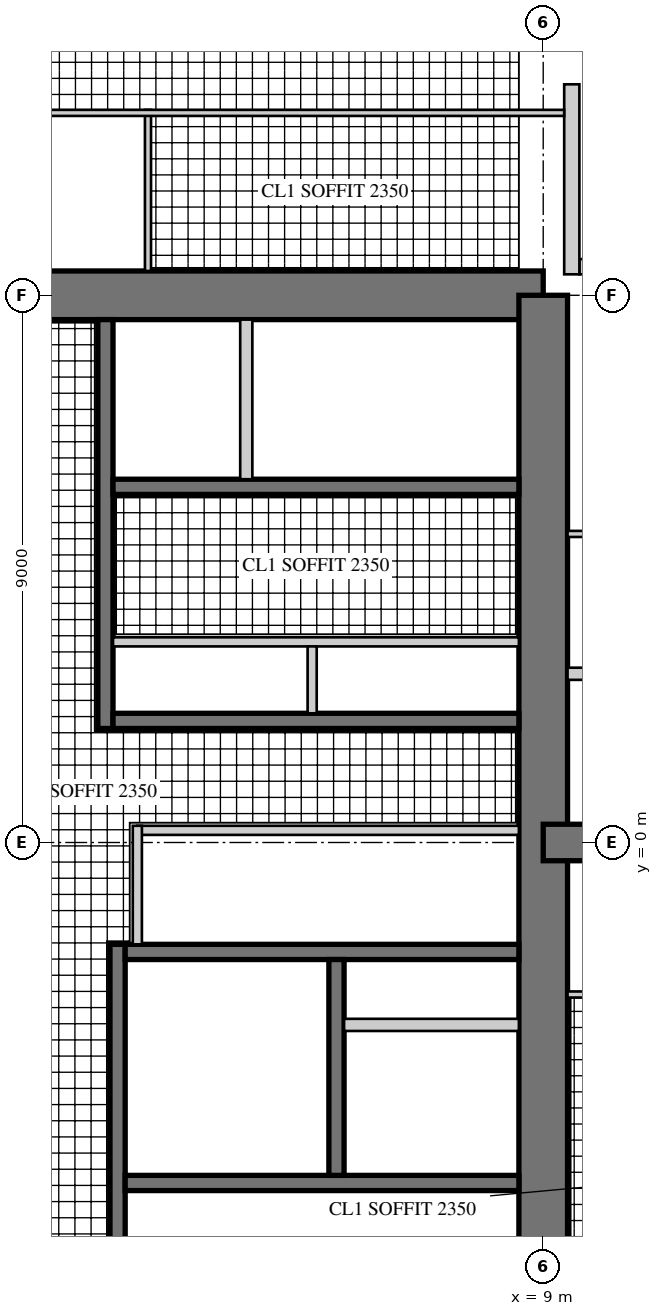
"""IFC4 building model, lengths in metres.
Left out: names, types, materials, properties, quantities, classifications, styles, units other than length and angle.
Written with IfcOpenShell. Run it as: python <this file> out.ifc"""

import sys

from ifc_helpers import new_model, si_unit, direction, frame, frame_2d, origin, place, context, subcontext, project, spatial, rectangle, hollow_rectangle, extrude, element, fill, save


model = new_model("IFC4")
c1 = context("Model", 3, precision=1e-05, world=origin(), true_north=direction((0.0, 1.0)))
c2 = subcontext(c1, "Body", "Model", "MODEL_VIEW")
j1 = project(units=[si_unit("LENGTHUNIT", "METRE"), si_unit("PLANEANGLEUNIT", "RADIAN")], contexts=[c1])
p1 = place(None, origin())
s1 = spatial("IfcSite", under=j1, at=p1, CompositionType="ELEMENT")
p2 = place(p1, origin())
s2 = spatial("IfcBuilding", under=s1, at=p2, CompositionType="ELEMENT")
p3 = place(p2, frame((0.0, 0.0, 261.1)))
s3 = spatial("IfcBuildingStorey", under=s2, at=p3, CompositionType="ELEMENT", Elevation=261.1)
p4 = place(p3, frame((9.0, 9.0, 0.0), z_axis=(0.0, 0.0, 1.0), x_axis=(-1.0, 0.0, 0.0)))
e1 = element("IfcWall", 1, at=p4, inside=s3, PredefinedType="SHEAR", context=c2, shape_type="SweptSolid", body=[
    extrude(rectangle(XDim=18.0, YDim=0.8, at=frame_2d((9.0, 0.0))), origin(), (0.0, 0.0, 1.0), 3.4),
])
p5 = place(p4, frame((9.8, 0.0, 0.0)))
e2 = element("IfcOpeningElement", 2, at=p5, cuts=e1, PredefinedType="OPENING", context=c2, shape_type="SweptSolid", body=[
    extrude(rectangle(XDim=1.0, YDim=2.4, at=frame_2d((0.5, 1.2))), frame((0.0, 0.41, 0.0), z_axis=(0.0, -1.0, 0.0), x_axis=(1.0, 0.0, 0.0)), (0.0, 0.0, 1.0), 0.82),
])
p6 = place(p3, frame((9.0, -9.0, 0.0), z_axis=(0.0, 0.0, 1.0), x_axis=(0.0, 1.0, 0.0)))
e3 = element("IfcWall", 3, at=p6, inside=s3, PredefinedType="SHEAR", context=c2, shape_type="SweptSolid", body=[
    extrude(rectangle(XDim=18.0, YDim=0.8, at=frame_2d((9.0, 0.0))), origin(), (0.0, 0.0, 1.0), 3.4),
])
p7 = place(p6, frame((9.8, 0.0, 0.0)))
e4 = element("IfcOpeningElement", 4, at=p7, cuts=e3, PredefinedType="OPENING", context=c2, shape_type="SweptSolid", body=[
    extrude(rectangle(XDim=1.0, YDim=2.4, at=frame_2d((0.5, 1.2))), frame((0.0, 0.41, 0.0), z_axis=(0.0, -1.0, 0.0), x_axis=(1.0, 0.0, 0.0)), (0.0, 0.0, 1.0), 0.82),
])
p8 = place(p3, frame((1.8, 1.875, 0.0), z_axis=(0.0, 0.0, 1.0), x_axis=(0.0, 1.0, 0.0)))
e5 = element("IfcWall", 5, at=p8, inside=s3, PredefinedType="SHEAR", context=c2, shape_type="SweptSolid", body=[
    extrude(rectangle(XDim=6.725, YDim=0.25, at=frame_2d((3.363, 0.0))), origin(), (0.0, 0.0, 1.0), 3.4),
])
p9 = place(p8, frame((1.875, 0.0, 0.0)))
e6 = element("IfcOpeningElement", 6, at=p9, cuts=e5, PredefinedType="OPENING", context=c2, shape_type="SweptSolid", body=[
    extrude(rectangle(XDim=1.6, YDim=2.4, at=frame_2d((0.8, 1.2))), frame((0.0, 0.135, 0.0), z_axis=(0.0, -1.0, 0.0), x_axis=(1.0, 0.0, 0.0)), (0.0, 0.0, 1.0), 0.27),
])
p10 = place(p3, frame((1.925, 2.0, 0.0), z_axis=(0.0, 0.0, 1.0), x_axis=(1.0, 0.0, 0.0)))
e7 = element("IfcWall", 7, at=p10, inside=s3, PredefinedType="SHEAR", context=c2, shape_type="SweptSolid", body=[
    extrude(rectangle(XDim=6.675, YDim=0.25, at=frame_2d((3.337, 0.0))), origin(), (0.0, 0.0, 1.0), 3.4),
])
p11 = place(p3, frame((1.925, 5.85, 0.0), z_axis=(0.0, 0.0, 1.0), x_axis=(1.0, 0.0, 0.0)))
e8 = element("IfcWall", 8, at=p11, inside=s3, PredefinedType="SHEAR", context=c2, shape_type="SweptSolid", body=[
    extrude(rectangle(XDim=6.675, YDim=0.25, at=frame_2d((3.337, 0.0))), origin(), (0.0, 0.0, 1.0), 3.4),
])
p12 = place(p11, frame((0.546, 0.0, 0.0)))
e9 = element("IfcOpeningElement", 9, at=p12, cuts=e8, PredefinedType="OPENING", context=c2, shape_type="SweptSolid", body=[
    extrude(rectangle(XDim=1.0, YDim=2.1, at=frame_2d((0.5, 1.05))), frame((0.0, 0.135, 0.0), z_axis=(0.0, -1.0, 0.0), x_axis=(1.0, 0.0, 0.0)), (0.0, 0.0, 1.0), 0.27),
])
p13 = place(p11, frame((2.837, 0.0, 0.0)))
e10 = element("IfcOpeningElement", 10, at=p13, cuts=e8, PredefinedType="OPENING", context=c2, shape_type="SweptSolid", body=[
    extrude(rectangle(XDim=1.0, YDim=2.1, at=frame_2d((0.5, 1.05))), frame((0.0, 0.135, 0.0), z_axis=(0.0, -1.0, 0.0), x_axis=(1.0, 0.0, 0.0)), (0.0, 0.0, 1.0), 0.27),
])
p14 = place(p3, frame((1.925, 3.3, 0.0), z_axis=(0.0, 0.0, 1.0), x_axis=(1.0, 0.0, 0.0)))
e11 = element("IfcWall", 11, at=p14, inside=s3, PredefinedType="PARTITIONING", context=c2, shape_type="SweptSolid", body=[
    extrude(rectangle(XDim=6.675, YDim=0.15, at=frame_2d((3.337, 0.0))), origin(), (0.0, 0.0, 1.0), 3.4),
])
p15 = place(p14, frame((0.075, 0.0, 0.0)))
e12 = element("IfcOpeningElement", 12, at=p15, cuts=e11, PredefinedType="OPENING", context=c2, shape_type="SweptSolid", body=[
    extrude(rectangle(XDim=0.8, YDim=2.1, at=frame_2d((0.4, 1.05))), frame((0.0, 0.085, 0.0), z_axis=(0.0, -1.0, 0.0), x_axis=(1.0, 0.0, 0.0)), (0.0, 0.0, 1.0), 0.17),
])
p16 = place(p14, frame((3.675, 0.0, 0.0)))
e13 = element("IfcOpeningElement", 13, at=p16, cuts=e11, PredefinedType="OPENING", context=c2, shape_type="SweptSolid", body=[
    extrude(rectangle(XDim=0.8, YDim=2.1, at=frame_2d((0.4, 1.05))), frame((0.0, 0.085, 0.0), z_axis=(0.0, -1.0, 0.0), x_axis=(1.0, 0.0, 0.0)), (0.0, 0.0, 1.0), 0.17),
])
p17 = place(p3, frame((5.2, 2.125, 0.0), z_axis=(0.0, 0.0, 1.0), x_axis=(0.0, 1.0, 0.0)))
e14 = element("IfcWall", 14, at=p17, inside=s3, PredefinedType="PARTITIONING", context=c2, shape_type="SweptSolid", body=[
    extrude(rectangle(XDim=1.1, YDim=0.15, at=frame_2d((0.55, 0.0))), origin(), (0.0, 0.0, 1.0), 3.4),
])
p18 = place(p3, frame((4.117, 5.975, 0.0), z_axis=(0.0, 0.0, 1.0), x_axis=(0.0, 1.0, 0.0)))
e15 = element("IfcWall", 15, at=p18, inside=s3, PredefinedType="PARTITIONING", context=c2, shape_type="SweptSolid", body=[
    extrude(rectangle(XDim=2.625, YDim=0.2, at=frame_2d((1.312, 0.0))), origin(), (0.0, 0.0, 1.0), 3.4),
])
p19 = place(p3, frame((2.0, -1.675, 0.0), z_axis=(0.0, 0.0, 1.0), x_axis=(0.0, -1.0, 0.0)))
e16 = element("IfcWall", 16, at=p19, inside=s3, PredefinedType="SHEAR", context=c2, shape_type="SweptSolid", body=[
    extrude(rectangle(XDim=6.925, YDim=0.25, at=frame_2d((3.462, 0.0))), origin(), (0.0, 0.0, 1.0), 3.4),
])
p20 = place(p19, frame((0.725, 0.0, 0.0)))
e17 = element("IfcOpeningElement", 17, at=p20, cuts=e16, PredefinedType="OPENING", context=c2, shape_type="SweptSolid", body=[
    extrude(rectangle(XDim=1.0, YDim=2.1, at=frame_2d((0.5, 1.05))), frame((0.0, 0.135, 0.0), z_axis=(0.0, -1.0, 0.0), x_axis=(1.0, 0.0, 0.0)), (0.0, 0.0, 1.0), 0.27),
])
p21 = place(p3, frame((2.125, -1.8, 0.0), z_axis=(0.0, 0.0, 1.0), x_axis=(1.0, 0.0, 0.0)))
e18 = element("IfcWall", 18, at=p21, inside=s3, PredefinedType="SHEAR", context=c2, shape_type="SweptSolid", body=[
    extrude(rectangle(XDim=6.475, YDim=0.25, at=frame_2d((3.238, 0.0))), origin(), (0.0, 0.0, 1.0), 3.4),
])
p22 = place(p3, frame((2.125, -5.6, 0.0), z_axis=(0.0, 0.0, 1.0), x_axis=(1.0, 0.0, 0.0)))
e19 = element("IfcWall", 19, at=p22, inside=s3, PredefinedType="SHEAR", context=c2, shape_type="SweptSolid", body=[
    extrude(rectangle(XDim=6.475, YDim=0.25, at=frame_2d((3.238, 0.0))), origin(), (0.0, 0.0, 1.0), 3.4),
])
p23 = place(p22, frame((0.175, 0.0, 0.0)))
e20 = element("IfcOpeningElement", 20, at=p23, cuts=e19, PredefinedType="OPENING", context=c2, shape_type="SweptSolid", body=[
    extrude(rectangle(XDim=1.0, YDim=2.1, at=frame_2d((0.5, 1.05))), frame((0.0, 0.135, 0.0), z_axis=(0.0, -1.0, 0.0), x_axis=(1.0, 0.0, 0.0)), (0.0, 0.0, 1.0), 0.27),
])
p24 = place(p3, frame((5.6, -1.925, 0.0), z_axis=(0.0, 0.0, 1.0), x_axis=(0.0, -1.0, 0.0)))
e21 = element("IfcWall", 21, at=p24, inside=s3, PredefinedType="SHEAR", context=c2, shape_type="SweptSolid", body=[
    extrude(rectangle(XDim=3.55, YDim=0.25, at=frame_2d((1.775, 0.0))), origin(), (0.0, 0.0, 1.0), 3.4),
])
p25 = place(p24, frame((1.525, 0.0, 0.0)))
e22 = element("IfcOpeningElement", 22, at=p25, cuts=e21, PredefinedType="OPENING", context=c2, shape_type="SweptSolid", body=[
    extrude(rectangle(XDim=1.1, YDim=2.2, at=frame_2d((0.55, 1.1))), frame((0.0, 0.135, 0.0), z_axis=(0.0, -1.0, 0.0), x_axis=(1.0, 0.0, 0.0)), (0.0, 0.0, 1.0), 0.27),
])
p26 = place(p24, frame((0.075, 0.0, 0.0)))
e23 = element("IfcOpeningElement", 23, at=p26, cuts=e21, PredefinedType="OPENING", context=c2, shape_type="SweptSolid", body=[
    extrude(rectangle(XDim=0.8, YDim=2.1, at=frame_2d((0.4, 1.05))), frame((0.0, 0.135, 0.0), z_axis=(0.0, -1.0, 0.0), x_axis=(1.0, 0.0, 0.0)), (0.0, 0.0, 1.0), 0.27),
])
p27 = place(p3, frame((5.725, -3.0, 0.0), z_axis=(0.0, 0.0, 1.0), x_axis=(1.0, 0.0, 0.0)))
e24 = element("IfcWall", 24, at=p27, inside=s3, PredefinedType="PARTITIONING", context=c2, shape_type="SweptSolid", body=[
    extrude(rectangle(XDim=2.875, YDim=0.2, at=frame_2d((1.438, 0.0))), origin(), (0.0, 0.0, 1.0), 3.4),
])
p28 = place(p3, frame((9.0, 0.0, 0.0), z_axis=(0.0, 0.0, 1.0), x_axis=(1.0, 0.0, 0.0)))
e25 = element("IfcWall", 25, at=p28, inside=s3, PredefinedType="SHEAR", context=c2, shape_type="SweptSolid", body=[
    extrude(rectangle(XDim=9.0, YDim=0.6, at=frame_2d((4.5, 0.0))), origin(), (0.0, 0.0, 1.0), 3.4),
])
p29 = place(p28, frame((3.8, 0.0, 0.0)))
e26 = element("IfcOpeningElement", 26, at=p29, cuts=e25, PredefinedType="OPENING", context=c2, shape_type="SweptSolid", body=[
    extrude(rectangle(XDim=1.0, YDim=2.15, at=frame_2d((0.5, 1.075))), frame((0.0, 0.31, 0.0), z_axis=(0.0, -1.0, 0.0), x_axis=(1.0, 0.0, 0.0)), (0.0, 0.0, 1.0), 0.62),
])
p30 = place(p28, frame((7.0, 0.0, 0.0)))
e27 = element("IfcOpeningElement", 27, at=p30, cuts=e25, PredefinedType="OPENING", context=c2, shape_type="SweptSolid", body=[
    extrude(rectangle(XDim=1.0, YDim=2.2, at=frame_2d((0.5, 1.1))), frame((0.0, 0.31, 0.0), z_axis=(0.0, -1.0, 0.0), x_axis=(1.0, 0.0, 0.0)), (0.0, 0.0, 1.0), 0.62),
])
p31 = place(p3, frame((12.47, 9.47, 0.0), z_axis=(0.0, 0.0, 1.0), x_axis=(-1.0, 0.0, 0.0)))
e28 = element("IfcWall", 28, at=p31, inside=s3, PredefinedType="SOLIDWALL", context=c2, shape_type="SweptSolid", body=[
    extrude(rectangle(XDim=2.875, YDim=0.25, at=frame_2d((1.438, 0.0))), origin(), (0.0, 0.0, 1.0), 3.22),
])
p32 = place(p31, frame((0.6, 0.0, 0.0)))
e29 = element("IfcOpeningElement", 29, at=p32, cuts=e28, PredefinedType="OPENING", context=c2, shape_type="SweptSolid", body=[
    extrude(rectangle(XDim=1.0, YDim=2.2, at=frame_2d((0.5, 1.1))), frame((0.0, 0.135, 0.0), z_axis=(0.0, -1.0, 0.0), x_axis=(1.0, 0.0, 0.0)), (0.0, 0.0, 1.0), 0.27),
])
p33 = place(p3, frame((9.47, 9.345, 0.0), z_axis=(0.0, 0.0, 1.0), x_axis=(0.0, 1.0, 0.0)))
e30 = element("IfcWall", 30, at=p33, inside=s3, PredefinedType="SOLIDWALL", context=c2, shape_type="SweptSolid", body=[
    extrude(rectangle(XDim=3.125, YDim=0.25, at=frame_2d((1.562, 0.0))), origin(), (0.0, 0.0, 1.0), 3.22),
])
p34 = place(p33, frame((0.6, 0.0, 0.0)))
e31 = element("IfcOpeningElement", 31, at=p34, cuts=e30, PredefinedType="OPENING", context=c2, shape_type="SweptSolid", body=[
    extrude(rectangle(XDim=1.0, YDim=2.2, at=frame_2d((0.5, 1.1))), frame((0.0, 0.135, 0.0), z_axis=(0.0, -1.0, 0.0), x_axis=(1.0, 0.0, 0.0)), (0.0, 0.0, 1.0), 0.27),
])
p35 = place(p3, frame((2.325, 0.2, 0.0), z_axis=(0.0, 0.0, 1.0), x_axis=(1.0, 0.0, 0.0)))
e32 = element("IfcWall", 32, at=p35, inside=s3, PredefinedType="PARTITIONING", context=c2, shape_type="SweptSolid", body=[
    extrude(rectangle(XDim=6.275, YDim=0.15, at=frame_2d((3.138, 0.0))), origin(), (0.0, 0.0, 1.0), 3.22),
])
p36 = place(p35, frame((0.4, 0.0, 0.0)))
e33 = element("IfcOpeningElement", 33, at=p36, cuts=e32, PredefinedType="OPENING", context=c2, shape_type="SweptSolid", body=[
    extrude(rectangle(XDim=1.0, YDim=2.1, at=frame_2d((0.5, 1.05))), frame((0.0, 0.085, 0.0), z_axis=(0.0, -1.0, 0.0), x_axis=(1.0, 0.0, 0.0)), (0.0, 0.0, 1.0), 0.17),
])
p37 = place(p3, frame((2.325, -1.675, 0.0), z_axis=(0.0, 0.0, 1.0), x_axis=(0.0, 1.0, 0.0)))
e34 = element("IfcWall", 34, at=p37, inside=s3, PredefinedType="PARTITIONING", context=c2, shape_type="SweptSolid", body=[
    extrude(rectangle(XDim=1.95, YDim=0.15, at=frame_2d((0.975, 0.0))), origin(), (0.0, 0.0, 1.0), 3.22),
])
p38 = place(p3, frame((2.5, 9.4, 0.0), z_axis=(0.0, 0.0, 1.0), x_axis=(0.0, 1.0, 0.0)))
e35 = element("IfcWall", 35, at=p38, inside=s3, PredefinedType="PARTITIONING", context=c2, shape_type="SweptSolid", body=[
    extrude(rectangle(XDim=2.65, YDim=0.1, at=frame_2d((1.325, 0.0))), origin(), (0.0, 0.0, 1.0), 3.22),
])
p39 = place(p3, frame((9.345, 12.0, 0.0), z_axis=(0.0, 0.0, 1.0), x_axis=(-1.0, 0.0, 0.0)))
e36 = element("IfcWall", 36, at=p39, inside=s3, PredefinedType="PARTITIONING", context=c2, shape_type="SweptSolid", body=[
    extrude(rectangle(XDim=9.045, YDim=0.1, at=frame_2d((4.522, 0.0))), origin(), (0.0, 0.0, 1.0), 3.22),
])
p40 = place(p39, frame((5.495, 0.0, 0.0)))
e37 = element("IfcOpeningElement", 37, at=p40, cuts=e36, PredefinedType="OPENING", context=c2, shape_type="SweptSolid", body=[
    extrude(rectangle(XDim=0.9, YDim=2.1, at=frame_2d((0.45, 1.05))), frame((0.0, 0.06, 0.0), z_axis=(0.0, -1.0, 0.0), x_axis=(1.0, 0.0, 0.0)), (0.0, 0.0, 1.0), 0.12),
])
p41 = place(p39, frame((7.595, 0.0, 0.0)))
e38 = element("IfcOpeningElement", 38, at=p41, cuts=e36, PredefinedType="OPENING", context=c2, shape_type="SweptSolid", body=[
    extrude(rectangle(XDim=0.9, YDim=2.1, at=frame_2d((0.45, 1.05))), frame((0.0, 0.06, 0.0), z_axis=(0.0, -1.0, 0.0), x_axis=(1.0, 0.0, 0.0)), (0.0, 0.0, 1.0), 0.12),
])
p42 = place(p3, frame((9.4, 5.075, 0.0), z_axis=(0.0, 0.0, 1.0), x_axis=(1.0, 0.0, 0.0)))
e39 = element("IfcWall", 39, at=p42, inside=s3, PredefinedType="PARTITIONING", context=c2, shape_type="SweptSolid", body=[
    extrude(rectangle(XDim=3.25, YDim=0.1, at=frame_2d((1.625, 0.0))), origin(), (0.0, 0.0, 1.0), 3.22),
])
p43 = place(p3, frame((9.4, -2.5, 0.0), z_axis=(0.0, 0.0, 1.0), x_axis=(1.0, 0.0, 0.0)))
e40 = element("IfcWall", 40, at=p43, inside=s3, PredefinedType="PARTITIONING", context=c2, shape_type="SweptSolid", body=[
    extrude(rectangle(XDim=2.65, YDim=0.1, at=frame_2d((1.325, 0.0))), origin(), (0.0, 0.0, 1.0), 3.22),
])
p44 = place(p3, frame((9.4, 2.775, 0.0), z_axis=(0.0, 0.0, 1.0), x_axis=(1.0, 0.0, 0.0)))
e41 = element("IfcWall", 41, at=p44, inside=s3, PredefinedType="SOLIDWALL", context=c2, shape_type="SweptSolid", body=[
    extrude(rectangle(XDim=5.6, YDim=0.2, at=frame_2d((2.8, 0.0))), origin(), (0.0, 0.0, 1.0), 3.22),
])
p45 = place(p44, frame((3.75, 0.0, 0.0)))
e42 = element("IfcOpeningElement", 42, at=p45, cuts=e41, PredefinedType="OPENING", context=c2, shape_type="SweptSolid", body=[
    extrude(rectangle(XDim=1.0, YDim=2.15, at=frame_2d((0.5, 1.075))), frame((0.0, 0.11, 0.0), z_axis=(0.0, -1.0, 0.0), x_axis=(1.0, 0.0, 0.0)), (0.0, 0.0, 1.0), 0.22),
])
p46 = place(p34, origin())
e43 = element("IfcDoor", 43, at=p46, inside=s3, OperationType="SINGLE_SWING_LEFT", PredefinedType="DOOR", context=c2, shape_type="SweptSolid", body=[
    extrude(hollow_rectangle(XDim=1.0, YDim=2.2, WallThickness=0.06, at=frame_2d((0.5, 1.1))), frame((0.0, 0.025, 0.0), z_axis=(0.0, -1.0, 0.0), x_axis=(1.0, 0.0, 0.0)), (0.0, 0.0, 1.0), 0.05),
    extrude(rectangle(XDim=0.879, YDim=2.079, at=frame_2d((0.5, 1.1))), frame((0.0, 0.025, 0.0), z_axis=(0.0, -1.0, 0.0), x_axis=(1.0, 0.0, 0.0)), (0.0, 0.0, 1.0), 0.05),
])
fill(e31, e43)
p47 = place(p36, frame((1.0, 0.0, 0.0), z_axis=(0.0, 0.0, 1.0), x_axis=(-1.0, 0.0, 0.0)))
e44 = element("IfcDoor", 44, at=p47, inside=s3, OperationType="SINGLE_SWING_RIGHT", PredefinedType="DOOR", context=c2, shape_type="SweptSolid", body=[
    extrude(rectangle(XDim=1.0, YDim=2.1, at=frame_2d((0.5, 1.05))), frame((0.0, 0.025, 0.0), z_axis=(0.0, -1.0, 0.0), x_axis=(1.0, 0.0, 0.0)), (0.0, 0.0, 1.0), 0.05),
])
fill(e33, e44)
p48 = place(p40, origin())
e45 = element("IfcDoor", 45, at=p48, inside=s3, OperationType="SINGLE_SWING_RIGHT", PredefinedType="DOOR", context=c2, shape_type="SweptSolid", body=[
    extrude(rectangle(XDim=0.9, YDim=2.1, at=frame_2d((0.45, 1.05))), frame((0.0, 0.025, 0.0), z_axis=(0.0, -1.0, 0.0), x_axis=(1.0, 0.0, 0.0)), (0.0, 0.0, 1.0), 0.05),
])
fill(e37, e45)
p49 = place(p41, origin())
e46 = element("IfcDoor", 46, at=p49, inside=s3, OperationType="SINGLE_SWING_RIGHT", PredefinedType="DOOR", context=c2, shape_type="SweptSolid", body=[
    extrude(rectangle(XDim=0.9, YDim=2.1, at=frame_2d((0.45, 1.05))), frame((0.0, 0.025, 0.0), z_axis=(0.0, -1.0, 0.0), x_axis=(1.0, 0.0, 0.0)), (0.0, 0.0, 1.0), 0.05),
])
fill(e38, e46)
p50 = place(p7, origin())
e47 = element("IfcDoor", 47, at=p50, inside=s3, OperationType="SINGLE_SWING_RIGHT", PredefinedType="DOOR", context=c2, shape_type="SweptSolid", body=[
    extrude(rectangle(XDim=1.0, YDim=2.4, at=frame_2d((0.5, 1.2))), frame((0.0, 0.055, 0.0), z_axis=(0.0, -1.0, 0.0), x_axis=(1.0, 0.0, 0.0)), (0.0, 0.0, 1.0), 0.05),
])
fill(e4, e47)
p51 = place(p9, frame((1.6, 0.0, 0.0), z_axis=(0.0, 0.0, 1.0), x_axis=(-1.0, 0.0, 0.0)))
e48 = element("IfcDoor", 48, at=p51, inside=s3, OperationType="DOUBLE_DOOR_SINGLE_SWING", PredefinedType="DOOR", context=c2, shape_type="SweptSolid", body=[
    extrude(rectangle(XDim=1.6, YDim=2.4, at=frame_2d((0.8, 1.2))), frame((0.0, 0.025, 0.0), z_axis=(0.0, -1.0, 0.0), x_axis=(1.0, 0.0, 0.0)), (0.0, 0.0, 1.0), 0.05),
])
fill(e6, e48)
p52 = place(p15, frame((0.8, 0.0, 0.0), z_axis=(0.0, 0.0, 1.0), x_axis=(-1.0, 0.0, 0.0)))
e49 = element("IfcDoor", 49, at=p52, inside=s3, OperationType="SINGLE_SWING_RIGHT", PredefinedType="DOOR", context=c2, shape_type="SweptSolid", body=[
    extrude(rectangle(XDim=0.8, YDim=2.1, at=frame_2d((0.4, 1.05))), frame((0.0, 0.025, 0.0), z_axis=(0.0, -1.0, 0.0), x_axis=(1.0, 0.0, 0.0)), (0.0, 0.0, 1.0), 0.05),
])
fill(e12, e49)
p53 = place(p16, frame((0.8, 0.0, 0.0), z_axis=(0.0, 0.0, 1.0), x_axis=(-1.0, 0.0, 0.0)))
e50 = element("IfcDoor", 50, at=p53, inside=s3, OperationType="SINGLE_SWING_RIGHT", PredefinedType="DOOR", context=c2, shape_type="SweptSolid", body=[
    extrude(rectangle(XDim=0.8, YDim=2.1, at=frame_2d((0.4, 1.05))), frame((0.0, 0.025, 0.0), z_axis=(0.0, -1.0, 0.0), x_axis=(1.0, 0.0, 0.0)), (0.0, 0.0, 1.0), 0.05),
])
fill(e13, e50)
p54 = place(p20, origin())
e51 = element("IfcDoor", 51, at=p54, inside=s3, OperationType="SINGLE_SWING_LEFT", PredefinedType="DOOR", context=c2, shape_type="SweptSolid", body=[
    extrude(rectangle(XDim=1.0, YDim=2.1, at=frame_2d((0.5, 1.05))), frame((0.0, 0.025, 0.0), z_axis=(0.0, -1.0, 0.0), x_axis=(1.0, 0.0, 0.0)), (0.0, 0.0, 1.0), 0.05),
])
fill(e17, e51)
p55 = place(p23, frame((1.0, 0.0, 0.0), z_axis=(0.0, 0.0, 1.0), x_axis=(-1.0, 0.0, 0.0)))
e52 = element("IfcDoor", 52, at=p55, inside=s3, OperationType="SINGLE_SWING_RIGHT", PredefinedType="DOOR", context=c2, shape_type="SweptSolid", body=[
    extrude(rectangle(XDim=1.0, YDim=2.1, at=frame_2d((0.5, 1.05))), frame((0.0, 0.025, 0.0), z_axis=(0.0, -1.0, 0.0), x_axis=(1.0, 0.0, 0.0)), (0.0, 0.0, 1.0), 0.05),
])
fill(e20, e52)
p56 = place(p25, origin())
e53 = element("IfcDoor", 53, at=p56, inside=s3, OperationType="DOUBLE_DOOR_SLIDING", PredefinedType="DOOR", context=c2, shape_type="SweptSolid", body=[
    extrude(rectangle(XDim=1.1, YDim=2.2, at=frame_2d((0.55, 1.1))), frame((0.0, 0.025, 0.0), z_axis=(0.0, -1.0, 0.0), x_axis=(1.0, 0.0, 0.0)), (0.0, 0.0, 1.0), 0.05),
])
fill(e22, e53)
p57 = place(p26, origin())
e54 = element("IfcDoor", 54, at=p57, inside=s3, OperationType="SINGLE_SWING_LEFT", PredefinedType="DOOR", context=c2, shape_type="SweptSolid", body=[
    extrude(rectangle(XDim=0.8, YDim=2.1, at=frame_2d((0.4, 1.05))), frame((0.0, 0.025, 0.0), z_axis=(0.0, -1.0, 0.0), x_axis=(1.0, 0.0, 0.0)), (0.0, 0.0, 1.0), 0.05),
])
fill(e23, e54)
p58 = place(p12, origin())
e55 = element("IfcDoor", 55, at=p58, inside=s3, OperationType="SINGLE_SWING_LEFT", PredefinedType="DOOR", context=c2, shape_type="SweptSolid", body=[
    extrude(rectangle(XDim=1.0, YDim=2.1, at=frame_2d((0.5, 1.05))), frame((0.0, 0.025, 0.0), z_axis=(0.0, -1.0, 0.0), x_axis=(1.0, 0.0, 0.0)), (0.0, 0.0, 1.0), 0.05),
])
fill(e9, e55)
p59 = place(p13, origin())
e56 = element("IfcDoor", 56, at=p59, inside=s3, OperationType="SINGLE_SWING_LEFT", PredefinedType="DOOR", context=c2, shape_type="SweptSolid", body=[
    extrude(rectangle(XDim=1.0, YDim=2.1, at=frame_2d((0.5, 1.05))), frame((0.0, 0.025, 0.0), z_axis=(0.0, -1.0, 0.0), x_axis=(1.0, 0.0, 0.0)), (0.0, 0.0, 1.0), 0.05),
])
fill(e10, e56)
save(model, sys.argv[1])
